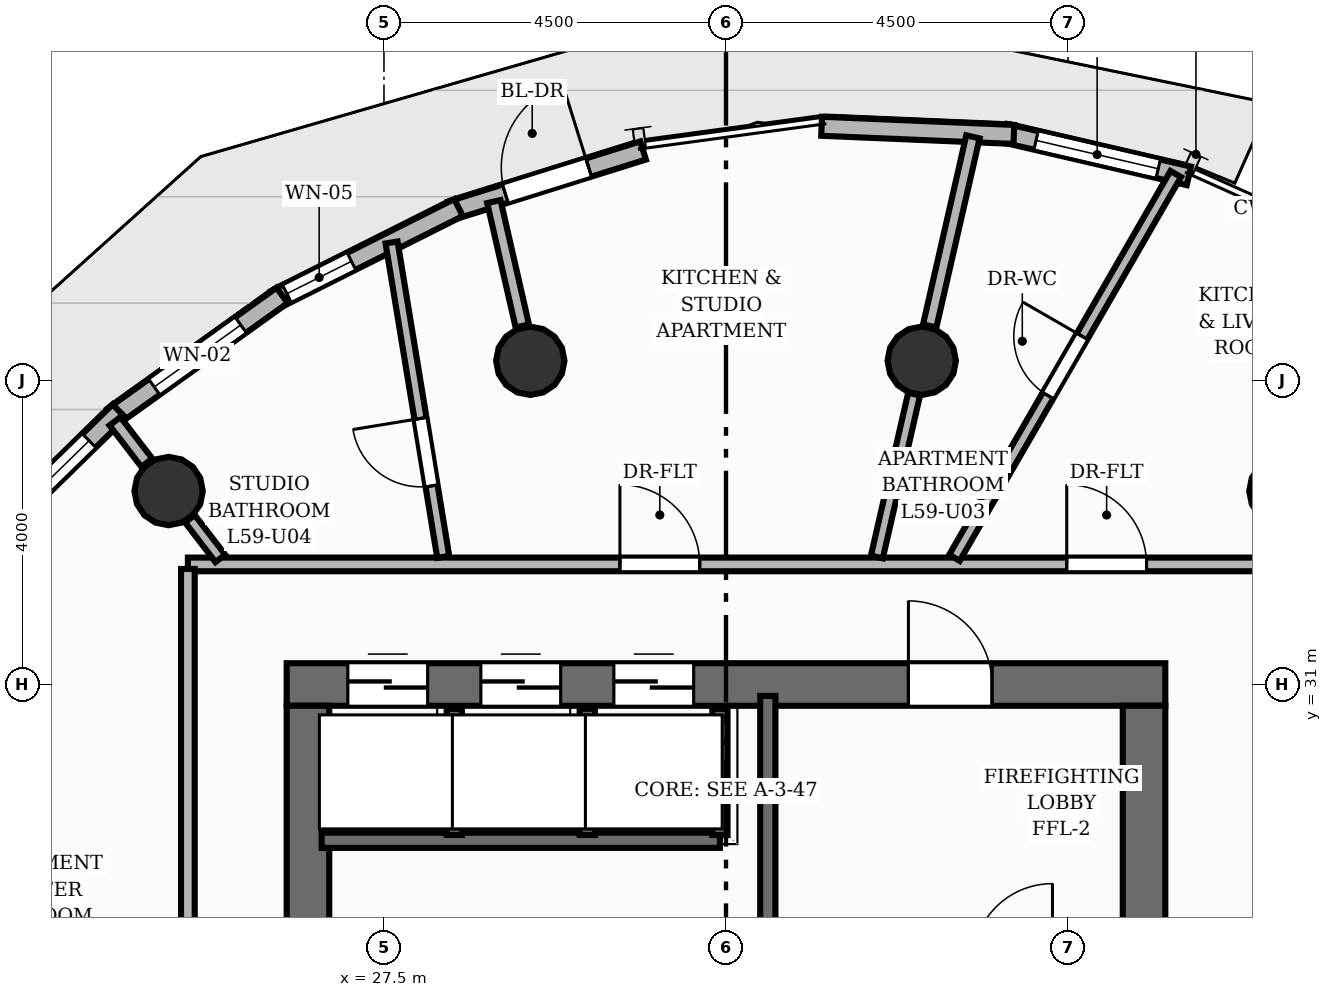
"""IFC4 building model, lengths in metres.
Left out: names, types, materials, properties, quantities, classifications, styles, units other than length and angle.
Written with IfcOpenShell. Run it as: python <this file> out.ifc"""

import sys

from ifc_helpers import new_model, si_unit, direction, frame, frame_2d, origin, origin_2d, place, context, subcontext, project, spatial, rectangle, circle, extrude, element, fill, save


model = new_model("IFC4")
c1 = context("Model", 3, precision=1e-05, world=origin(), true_north=direction((0.0, 1.0)))
c2 = subcontext(c1, "Body", "Model", "MODEL_VIEW")
j1 = project(units=[si_unit("LENGTHUNIT", "METRE"), si_unit("PLANEANGLEUNIT", "RADIAN")], contexts=[c1])
p1 = place(None, origin())
s1 = spatial("IfcSite", under=j1, at=p1, CompositionType="ELEMENT")
p2 = place(p1, origin())
s2 = spatial("IfcBuilding", under=s1, at=p2, CompositionType="ELEMENT")
p3 = place(p2, frame((0.0, 0.0, 198.24)))
s3 = spatial("IfcBuildingStorey", under=s2, at=p3, CompositionType="ELEMENT", Elevation=198.24)
p4 = place(p3, frame((26.22, 31.0, 0.0), z_axis=(0.0, 0.0, 1.0), x_axis=(1.0, 0.0, 0.0)))
e1 = element("IfcWall", 1, at=p4, inside=s3, PredefinedType="SHEAR", context=c2, shape_type="SweptSolid", body=[
    extrude(rectangle(XDim=11.56, YDim=0.56, at=frame_2d((5.78, 0.0))), origin(), (0.0, 0.0, 1.0), 3.2),
])
p5 = place(p4, frame((8.18, 0.0, 0.0)))
e2 = element("IfcOpeningElement", 2, at=p5, cuts=e1, PredefinedType="OPENING", context=c2, shape_type="SweptSolid", body=[
    extrude(rectangle(XDim=1.1, YDim=2.15, at=frame_2d((0.55, 1.075))), frame((0.0, 0.29, 0.0), z_axis=(0.0, -1.0, 0.0), x_axis=(1.0, 0.0, 0.0)), (0.0, 0.0, 1.0), 0.58),
])
p6 = place(p4, frame((0.805, 0.0, 0.0)))
e3 = element("IfcOpeningElement", 3, at=p6, cuts=e1, PredefinedType="OPENING", context=c2, shape_type="SweptSolid", body=[
    extrude(rectangle(XDim=1.05, YDim=2.15, at=frame_2d((0.525, 1.075))), frame((0.0, 0.29, 0.0), z_axis=(0.0, -1.0, 0.0), x_axis=(1.0, 0.0, 0.0)), (0.0, 0.0, 1.0), 0.58),
])
p7 = place(p4, frame((2.555, 0.0, 0.0)))
e4 = element("IfcOpeningElement", 4, at=p7, cuts=e1, PredefinedType="OPENING", context=c2, shape_type="SweptSolid", body=[
    extrude(rectangle(XDim=1.05, YDim=2.15, at=frame_2d((0.525, 1.075))), frame((0.0, 0.29, 0.0), z_axis=(0.0, -1.0, 0.0), x_axis=(1.0, 0.0, 0.0)), (0.0, 0.0, 1.0), 0.58),
])
p8 = place(p4, frame((4.305, 0.0, 0.0)))
e5 = element("IfcOpeningElement", 5, at=p8, cuts=e1, PredefinedType="OPENING", context=c2, shape_type="SweptSolid", body=[
    extrude(rectangle(XDim=1.05, YDim=2.15, at=frame_2d((0.525, 1.075))), frame((0.0, 0.29, 0.0), z_axis=(0.0, -1.0, 0.0), x_axis=(1.0, 0.0, 0.0)), (0.0, 0.0, 1.0), 0.58),
])
for number, where, z_axis, x_axis in (
    (6, (26.5, 17.28, 0.0), (0.0, 0.0, 1.0), (0.0, 1.0, 0.0)),
    (7, (37.5, 17.28, 0.0), (0.0, 0.0, 1.0), (0.0, 1.0, 0.0)),
):
    element("IfcWall", number, at=place(p3, frame(where, z_axis=z_axis, x_axis=x_axis)), inside=s3, PredefinedType="SHEAR", context=c2, shape_type="SweptSolid", body=[
        extrude(rectangle(XDim=13.44, YDim=0.56, at=frame_2d((6.72, 0.0))), origin(), (0.0, 0.0, 1.0), 3.2),
    ])
for number, where, z_axis, x_axis in (
    (8, (39.333, 33.545, 0.0), (0.0, 0.0, 1.0), (1.0, 0.0, 0.0)),
    (9, (34.575, 35.26, 0.0), (0.0, 0.0, 1.0), (1.0, 0.0, 0.0)),
    (10, (29.425, 35.26, 0.0), (0.0, 0.0, 1.0), (1.0, 0.0, 0.0)),
    (11, (24.667, 33.545, 0.0), (0.0, 0.0, 1.0), (1.0, 0.0, 0.0)),
):
    element("IfcColumn", number, at=place(p3, frame(where, z_axis=z_axis, x_axis=x_axis)), inside=s3, PredefinedType="COLUMN", context=c2, shape_type="SweptSolid", body=[
        extrude(circle(Radius=0.45, at=origin_2d()), origin(), (0.0, 0.0, 1.0), 3.2),
    ])
p9 = place(p3, frame((35.676, 38.253, 0.0), z_axis=(0.0, 0.0, 1.0), x_axis=(0.974096425092, -0.226133046286, 0.0)))
e12 = element("IfcWall", 12, at=p9, inside=s3, PredefinedType="SOLIDWALL", context=c2, shape_type="SweptSolid", body=[
    extrude(rectangle(XDim=2.478, YDim=0.25, at=frame_2d((1.239, 0.0))), origin(), (0.0, 0.0, 1.0), 2.96),
])
p10 = place(p9, frame((0.414, 0.0, 0.85)))
e13 = element("IfcOpeningElement", 13, at=p10, cuts=e12, PredefinedType="OPENING", context=c2, shape_type="SweptSolid", body=[
    extrude(rectangle(XDim=1.65, YDim=1.55, at=frame_2d((0.825, 0.775))), frame((0.0, 0.135, 0.0), z_axis=(0.0, -1.0, 0.0), x_axis=(1.0, 0.0, 0.0)), (0.0, 0.0, 1.0), 0.27),
])
p11 = place(p3, frame((33.258, 38.345, 0.0), z_axis=(0.0, 0.0, 1.0), x_axis=(0.999099670747, -0.042424614469, 0.0)))
e14 = element("IfcWall", 14, at=p11, inside=s3, PredefinedType="SOLIDWALL", context=c2, shape_type="SweptSolid", body=[
    extrude(rectangle(XDim=2.532, YDim=0.25, at=frame_2d((1.266, 0.0))), origin(), (0.0, 0.0, 1.0), 2.96),
])
p12 = place(p3, frame((28.379, 37.234, 0.0), z_axis=(0.0, 0.0, 1.0), x_axis=(0.954307768746, 0.298825505122, 0.0)))
e15 = element("IfcWall", 15, at=p12, inside=s3, PredefinedType="SOLIDWALL", context=c2, shape_type="SweptSolid", body=[
    extrude(rectangle(XDim=2.651, YDim=0.25, at=frame_2d((1.326, 0.0))), origin(), (0.0, 0.0, 1.0), 2.96),
])
p13 = place(p12, frame((0.751, 0.0, 0.0)))
e16 = element("IfcOpeningElement", 16, at=p13, cuts=e15, PredefinedType="OPENING", context=c2, shape_type="SweptSolid", body=[
    extrude(rectangle(XDim=1.15, YDim=2.2, at=frame_2d((0.575, 1.1))), frame((0.0, 0.135, 0.0), z_axis=(0.0, -1.0, 0.0), x_axis=(1.0, 0.0, 0.0)), (0.0, 0.0, 1.0), 0.27),
])
p14 = place(p3, frame((26.066, 36.063, 0.0), z_axis=(0.0, 0.0, 1.0), x_axis=(0.893757522153, 0.448550433724, 0.0)))
e17 = element("IfcWall", 17, at=p14, inside=s3, PredefinedType="SOLIDWALL", context=c2, shape_type="SweptSolid", body=[
    extrude(rectangle(XDim=2.702, YDim=0.25, at=frame_2d((1.351, 0.0))), origin(), (0.0, 0.0, 1.0), 2.96),
])
p15 = place(p14, frame((0.175, 0.0, 0.85)))
e18 = element("IfcOpeningElement", 18, at=p15, cuts=e17, PredefinedType="OPENING", context=c2, shape_type="SweptSolid", body=[
    extrude(rectangle(XDim=0.95, YDim=1.45, at=frame_2d((0.475, 0.725))), frame((0.0, 0.135, 0.0), z_axis=(0.0, -1.0, 0.0), x_axis=(1.0, 0.0, 0.0)), (0.0, 0.0, 1.0), 0.27),
])
p16 = place(p3, frame((23.934, 34.526, 0.0), z_axis=(0.0, 0.0, 1.0), x_axis=(0.812997900305, 0.58226661771, 0.0)))
e19 = element("IfcWall", 19, at=p16, inside=s3, PredefinedType="SOLIDWALL", context=c2, shape_type="SweptSolid", body=[
    extrude(rectangle(XDim=2.739, YDim=0.25, at=frame_2d((1.369, 0.0))), origin(), (0.0, 0.0, 1.0), 2.96),
])
p17 = place(p16, frame((0.669, 0.0, 0.85)))
e20 = element("IfcOpeningElement", 20, at=p17, cuts=e19, PredefinedType="OPENING", context=c2, shape_type="SweptSolid", body=[
    extrude(rectangle(XDim=1.4, YDim=1.55, at=frame_2d((0.7, 0.775))), frame((0.0, 0.135, 0.0), z_axis=(0.0, -1.0, 0.0), x_axis=(1.0, 0.0, 0.0)), (0.0, 0.0, 1.0), 0.27),
])
p18 = place(p3, frame((22.045, 32.667, 0.0), z_axis=(0.0, 0.0, 1.0), x_axis=(0.71485422762, 0.699273503898, 0.0)))
e21 = element("IfcWall", 21, at=p18, inside=s3, PredefinedType="SOLIDWALL", context=c2, shape_type="SweptSolid", body=[
    extrude(rectangle(XDim=2.758, YDim=0.25, at=frame_2d((1.379, 0.0))), origin(), (0.0, 0.0, 1.0), 2.96),
])
p19 = place(p18, frame((0.554, 0.0, 0.85)))
e22 = element("IfcOpeningElement", 22, at=p19, cuts=e21, PredefinedType="OPENING", context=c2, shape_type="SweptSolid", body=[
    extrude(rectangle(XDim=1.65, YDim=1.55, at=frame_2d((0.825, 0.775))), frame((0.0, 0.135, 0.0), z_axis=(0.0, -1.0, 0.0), x_axis=(1.0, 0.0, 0.0)), (0.0, 0.0, 1.0), 0.27),
])
p20 = place(p3, frame((32.55, 27.35, 0.0), z_axis=(0.0, 0.0, 1.0), x_axis=(0.0, 1.0, 0.0)))
e23 = element("IfcWall", 23, at=p20, inside=s3, PredefinedType="SHEAR", context=c2, shape_type="SweptSolid", body=[
    extrude(rectangle(XDim=3.5, YDim=0.2, at=frame_2d((1.75, 0.0))), origin(), (0.0, 0.0, 1.0), 3.2),
])
p21 = place(p3, frame((26.68, 28.95, 0.0), z_axis=(0.0, 0.0, 1.0), x_axis=(1.0, 0.0, 0.0)))
e24 = element("IfcWall", 24, at=p21, inside=s3, PredefinedType="SHEAR", context=c2, shape_type="SweptSolid", body=[
    extrude(rectangle(XDim=5.24, YDim=0.2, at=frame_2d((2.62, 0.0))), origin(), (0.0, 0.0, 1.0), 3.2),
])
for number, where, z_axis, x_axis in (
    (25, (31.92, 29.02, 0.0), (0.0, 0.0, 1.0), (0.0, 1.0, 0.0)),
    (26, (28.425, 29.02, 0.0), (0.0, 0.0, 1.0), (0.0, 1.0, 0.0)),
    (27, (30.175, 29.02, 0.0), (0.0, 0.0, 1.0), (0.0, 1.0, 0.0)),
):
    element("IfcWall", number, at=place(p3, frame(where, z_axis=z_axis, x_axis=x_axis)), inside=s3, PredefinedType="SHEAR", context=c2, shape_type="SweptSolid", body=[
        extrude(rectangle(XDim=1.66, YDim=0.2, at=frame_2d((0.83, 0.0))), origin(), (0.0, 0.0, 1.0), 3.2),
    ])
p22 = place(p3, frame((34.68, 35.718, 0.0), z_axis=(0.0, 0.0, 1.0), x_axis=(0.22299363946, 0.974819899654, 0.0)))
e28 = element("IfcWall", 28, at=p22, inside=s3, PredefinedType="PARTITIONING", context=c2, shape_type="SweptSolid", body=[
    extrude(rectangle(XDim=2.552, YDim=0.18, at=frame_2d((1.276, 0.0))), origin(), (0.0, 0.0, 1.0), 2.403),
])
p23 = place(p3, frame((29.32, 35.718, 0.0), z_axis=(0.0, 0.0, 1.0), x_axis=(-0.222978827263, 0.97482328788, 0.0)))
e29 = element("IfcWall", 29, at=p23, inside=s3, PredefinedType="PARTITIONING", context=c2, shape_type="SweptSolid", body=[
    extrude(rectangle(XDim=1.678, YDim=0.18, at=frame_2d((0.839, 0.0))), origin(), (0.0, 0.0, 1.0), 2.403),
])
p24 = place(p3, frame((24.38, 33.918, 0.0), z_axis=(0.0, 0.0, 1.0), x_axis=(-0.60904199592, 0.793137974885, 0.0)))
e30 = element("IfcWall", 30, at=p24, inside=s3, PredefinedType="PARTITIONING", context=c2, shape_type="SweptSolid", body=[
    extrude(rectangle(XDim=0.688, YDim=0.18, at=frame_2d((0.344, 0.0))), origin(), (0.0, 0.0, 1.0), 2.403),
])
p25 = place(p3, frame((24.92, 32.58, 0.0), z_axis=(0.0, 0.0, 1.0), x_axis=(1.0, 0.0, 0.0)))
e31 = element("IfcWall", 31, at=p25, inside=s3, PredefinedType="PARTITIONING", context=c2, shape_type="SweptSolid", body=[
    extrude(rectangle(XDim=14.16, YDim=0.18, at=frame_2d((7.08, 0.0))), origin(), (0.0, 0.0, 1.0), 2.955),
])
p26 = place(p25, frame((11.563, 0.0, 0.0)))
e32 = element("IfcOpeningElement", 32, at=p26, cuts=e31, PredefinedType="OPENING", context=c2, shape_type="SweptSolid", body=[
    extrude(rectangle(XDim=1.05, YDim=2.15, at=frame_2d((0.525, 1.075))), frame((0.0, 0.1, 0.0), z_axis=(0.0, -1.0, 0.0), x_axis=(1.0, 0.0, 0.0)), (0.0, 0.0, 1.0), 0.2),
])
p27 = place(p25, frame((5.684, 0.0, 0.0)))
e33 = element("IfcOpeningElement", 33, at=p27, cuts=e31, PredefinedType="OPENING", context=c2, shape_type="SweptSolid", body=[
    extrude(rectangle(XDim=1.05, YDim=2.15, at=frame_2d((0.525, 1.075))), frame((0.0, 0.1, 0.0), z_axis=(0.0, -1.0, 0.0), x_axis=(1.0, 0.0, 0.0)), (0.0, 0.0, 1.0), 0.2),
])
p28 = place(p3, frame((24.92, 26.46, 0.0), z_axis=(0.0, 0.0, 1.0), x_axis=(0.0, 1.0, 0.0)))
e34 = element("IfcWall", 34, at=p28, inside=s3, PredefinedType="PARTITIONING", context=c2, shape_type="SweptSolid", body=[
    extrude(rectangle(XDim=6.06, YDim=0.18, at=frame_2d((3.03, 0.0))), origin(), (0.0, 0.0, 1.0), 2.955),
])
p29 = place(p3, frame((35.005, 32.667, 0.0), z_axis=(0.0, 0.0, 1.0), x_axis=(0.499495237235, 0.866316632635, 0.0)))
e35 = element("IfcWall", 35, at=p29, inside=s3, PredefinedType="PLUMBINGWALL", context=c2, shape_type="SweptSolid", body=[
    extrude(rectangle(XDim=5.83, YDim=0.16, at=frame_2d((2.915, 0.0))), origin(), (0.0, 0.0, 1.0), 2.692),
])
p30 = place(p29, frame((2.465, 0.0, 0.0)))
e36 = element("IfcOpeningElement", 36, at=p30, cuts=e35, PredefinedType="OPENING", context=c2, shape_type="SweptSolid", body=[
    extrude(rectangle(XDim=0.9, YDim=2.1, at=frame_2d((0.45, 1.05))), frame((0.0, 0.09, 0.0), z_axis=(0.0, -1.0, 0.0), x_axis=(1.0, 0.0, 0.0)), (0.0, 0.0, 1.0), 0.18),
])
p31 = place(p3, frame((33.985, 32.677, 0.0), z_axis=(0.0, 0.0, 1.0), x_axis=(0.222969522248, 0.974825416241, 0.0)))
e37 = element("IfcWall", 37, at=p31, inside=s3, PredefinedType="PLUMBINGWALL", context=c2, shape_type="SweptSolid", body=[
    extrude(rectangle(XDim=2.199, YDim=0.16, at=frame_2d((1.099, 0.0))), origin(), (0.0, 0.0, 1.0), 2.403),
])
p32 = place(p3, frame((28.28, 32.679, 0.0), z_axis=(0.0, 0.0, 1.0), x_axis=(-0.162160778545, 0.986764349732, 0.0)))
e38 = element("IfcWall", 38, at=p32, inside=s3, PredefinedType="PLUMBINGWALL", context=c2, shape_type="SweptSolid", body=[
    extrude(rectangle(XDim=4.193, YDim=0.16, at=frame_2d((2.096, 0.0))), origin(), (0.0, 0.0, 1.0), 2.692),
])
p33 = place(p32, frame((0.947, 0.0, 0.0)))
e39 = element("IfcOpeningElement", 39, at=p33, cuts=e38, PredefinedType="OPENING", context=c2, shape_type="SweptSolid", body=[
    extrude(rectangle(XDim=0.9, YDim=2.1, at=frame_2d((0.45, 1.05))), frame((0.0, 0.09, 0.0), z_axis=(0.0, -1.0, 0.0), x_axis=(1.0, 0.0, 0.0)), (0.0, 0.0, 1.0), 0.18),
])
p34 = place(p3, frame((25.347, 32.659, 0.0), z_axis=(0.0, 0.0, 1.0), x_axis=(-0.609101063055, 0.79309261438, 0.0)))
e40 = element("IfcWall", 40, at=p34, inside=s3, PredefinedType="PLUMBINGWALL", context=c2, shape_type="SweptSolid", body=[
    extrude(rectangle(XDim=0.658, YDim=0.16, at=frame_2d((0.329, 0.0))), origin(), (0.0, 0.0, 1.0), 2.403),
])
p35 = place(p13, origin())
e41 = element("IfcDoor", 41, at=p35, inside=s3, OperationType="SINGLE_SWING_RIGHT", PredefinedType="DOOR", context=c2, shape_type="SweptSolid", body=[
    extrude(rectangle(XDim=1.15, YDim=2.2, at=frame_2d((0.575, 1.1))), frame((0.0, 0.025, 0.0), z_axis=(0.0, -1.0, 0.0), x_axis=(1.0, 0.0, 0.0)), (0.0, 0.0, 1.0), 0.05),
])
fill(e16, e41)
p36 = place(p10, origin())
e42 = element("IfcWindow", 42, at=p36, inside=s3, PartitioningType="SINGLE_PANEL", PredefinedType="WINDOW", context=c2, shape_type="SweptSolid", body=[
    extrude(rectangle(XDim=1.65, YDim=1.55, at=frame_2d((0.825, 0.775))), frame((0.0, 0.03, 0.0), z_axis=(0.0, -1.0, 0.0), x_axis=(1.0, 0.0, 0.0)), (0.0, 0.0, 1.0), 0.06),
])
fill(e13, e42)
p37 = place(p15, origin())
e43 = element("IfcWindow", 43, at=p37, inside=s3, PartitioningType="SINGLE_PANEL", PredefinedType="WINDOW", context=c2, shape_type="SweptSolid", body=[
    extrude(rectangle(XDim=0.95, YDim=1.45, at=frame_2d((0.475, 0.725))), frame((0.0, 0.03, 0.0), z_axis=(0.0, -1.0, 0.0), x_axis=(1.0, 0.0, 0.0)), (0.0, 0.0, 1.0), 0.06),
])
fill(e18, e43)
p38 = place(p17, origin())
e44 = element("IfcWindow", 44, at=p38, inside=s3, PartitioningType="SINGLE_PANEL", PredefinedType="WINDOW", context=c2, shape_type="SweptSolid", body=[
    extrude(rectangle(XDim=1.4, YDim=1.55, at=frame_2d((0.7, 0.775))), frame((0.0, 0.03, 0.0), z_axis=(0.0, -1.0, 0.0), x_axis=(1.0, 0.0, 0.0)), (0.0, 0.0, 1.0), 0.06),
])
fill(e20, e44)
p39 = place(p19, origin())
e45 = element("IfcWindow", 45, at=p39, inside=s3, PartitioningType="SINGLE_PANEL", PredefinedType="WINDOW", context=c2, shape_type="SweptSolid", body=[
    extrude(rectangle(XDim=1.65, YDim=1.55, at=frame_2d((0.825, 0.775))), frame((0.0, 0.03, 0.0), z_axis=(0.0, -1.0, 0.0), x_axis=(1.0, 0.0, 0.0)), (0.0, 0.0, 1.0), 0.06),
])
fill(e22, e45)
p40 = place(p5, origin())
e46 = element("IfcDoor", 46, at=p40, inside=s3, OperationType="SINGLE_SWING_LEFT", PredefinedType="DOOR", context=c2, shape_type="SweptSolid", body=[
    extrude(rectangle(XDim=1.1, YDim=2.15, at=frame_2d((0.55, 1.075))), frame((0.0, 0.025, 0.0), z_axis=(0.0, -1.0, 0.0), x_axis=(1.0, 0.0, 0.0)), (0.0, 0.0, 1.0), 0.05),
])
fill(e2, e46)
p41 = place(p6, origin())
e47 = element("IfcDoor", 47, at=p41, inside=s3, OperationType="DOUBLE_DOOR_SLIDING", PredefinedType="DOOR", context=c2, shape_type="SweptSolid", body=[
    extrude(rectangle(XDim=1.05, YDim=2.15, at=frame_2d((0.525, 1.075))), frame((0.0, 0.025, 0.0), z_axis=(0.0, -1.0, 0.0), x_axis=(1.0, 0.0, 0.0)), (0.0, 0.0, 1.0), 0.05),
])
fill(e3, e47)
p42 = place(p7, origin())
e48 = element("IfcDoor", 48, at=p42, inside=s3, OperationType="DOUBLE_DOOR_SLIDING", PredefinedType="DOOR", context=c2, shape_type="SweptSolid", body=[
    extrude(rectangle(XDim=1.05, YDim=2.15, at=frame_2d((0.525, 1.075))), frame((0.0, 0.025, 0.0), z_axis=(0.0, -1.0, 0.0), x_axis=(1.0, 0.0, 0.0)), (0.0, 0.0, 1.0), 0.05),
])
fill(e4, e48)
p43 = place(p8, origin())
e49 = element("IfcDoor", 49, at=p43, inside=s3, OperationType="DOUBLE_DOOR_SLIDING", PredefinedType="DOOR", context=c2, shape_type="SweptSolid", body=[
    extrude(rectangle(XDim=1.05, YDim=2.15, at=frame_2d((0.525, 1.075))), frame((0.0, 0.025, 0.0), z_axis=(0.0, -1.0, 0.0), x_axis=(1.0, 0.0, 0.0)), (0.0, 0.0, 1.0), 0.05),
])
fill(e5, e49)
p44 = place(p26, origin())
e50 = element("IfcDoor", 50, at=p44, inside=s3, OperationType="SINGLE_SWING_LEFT", PredefinedType="DOOR", context=c2, shape_type="SweptSolid", body=[
    extrude(rectangle(XDim=1.05, YDim=2.15, at=frame_2d((0.525, 1.075))), frame((0.0, 0.025, 0.0), z_axis=(0.0, -1.0, 0.0), x_axis=(1.0, 0.0, 0.0)), (0.0, 0.0, 1.0), 0.05),
])
fill(e32, e50)
p45 = place(p30, origin())
e51 = element("IfcDoor", 51, at=p45, inside=s3, OperationType="SINGLE_SWING_RIGHT", PredefinedType="DOOR", context=c2, shape_type="SweptSolid", body=[
    extrude(rectangle(XDim=0.9, YDim=2.1, at=frame_2d((0.45, 1.05))), frame((0.0, 0.025, 0.0), z_axis=(0.0, -1.0, 0.0), x_axis=(1.0, 0.0, 0.0)), (0.0, 0.0, 1.0), 0.05),
])
fill(e36, e51)
p46 = place(p27, origin())
e52 = element("IfcDoor", 52, at=p46, inside=s3, OperationType="SINGLE_SWING_LEFT", PredefinedType="DOOR", context=c2, shape_type="SweptSolid", body=[
    extrude(rectangle(XDim=1.05, YDim=2.15, at=frame_2d((0.525, 1.075))), frame((0.0, 0.025, 0.0), z_axis=(0.0, -1.0, 0.0), x_axis=(1.0, 0.0, 0.0)), (0.0, 0.0, 1.0), 0.05),
])
fill(e33, e52)
p47 = place(p33, origin())
e53 = element("IfcDoor", 53, at=p47, inside=s3, OperationType="SINGLE_SWING_RIGHT", PredefinedType="DOOR", context=c2, shape_type="SweptSolid", body=[
    extrude(rectangle(XDim=0.9, YDim=2.1, at=frame_2d((0.45, 1.05))), frame((0.0, 0.025, 0.0), z_axis=(0.0, -1.0, 0.0), x_axis=(1.0, 0.0, 0.0)), (0.0, 0.0, 1.0), 0.05),
])
fill(e39, e53)
save(model, sys.argv[1])
